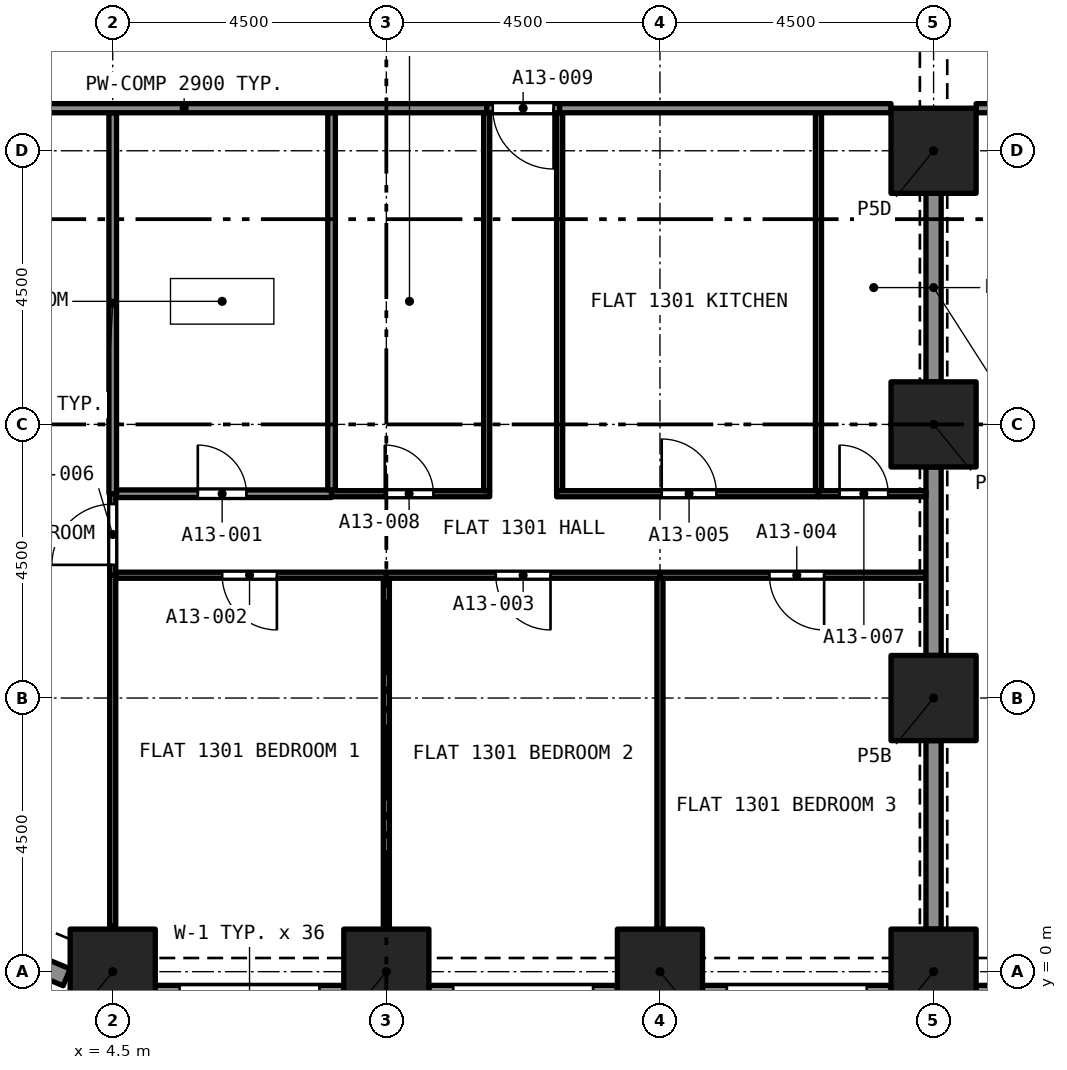
"""IFC4 building model, lengths in metres.
Left out: names, types, materials, properties, quantities, classifications, styles, units other than length and angle.
Written with IfcOpenShell. Run it as: python <this file> out.ifc"""

import sys

from ifc_helpers import new_model, si_unit, direction, frame, frame_2d, origin, origin_2d, place, context, subcontext, project, spatial, rectangle, extrude, element, fill, save


model = new_model("IFC4")
c1 = context("Model", 3, precision=1e-05, world=origin(), true_north=direction((0.0, 1.0)))
c2 = subcontext(c1, "Body", "Model", "MODEL_VIEW")
j1 = project(units=[si_unit("LENGTHUNIT", "METRE"), si_unit("PLANEANGLEUNIT", "RADIAN")], contexts=[c1])
p1 = place(None, origin())
s1 = spatial("IfcSite", under=j1, at=p1, CompositionType="ELEMENT")
p2 = place(p1, origin())
s2 = spatial("IfcBuilding", under=s1, at=p2, CompositionType="ELEMENT")
p3 = place(p2, frame((0.0, 0.0, 52.8)))
s3 = spatial("IfcBuildingStorey", under=s2, at=p3, CompositionType="ELEMENT", Elevation=52.8)
for number, where, z_axis, x_axis in (
    (1, (4.5, 0.0, 0.0), (0.0, 0.0, 1.0), (1.0, 0.0, 0.0)),
    (2, (9.0, 0.0, 0.0), (0.0, 0.0, 1.0), (1.0, 0.0, 0.0)),
    (3, (13.5, 0.0, 0.0), (0.0, 0.0, 1.0), (1.0, 0.0, 0.0)),
    (4, (18.0, 0.0, 0.0), (0.0, 0.0, 1.0), (1.0, 0.0, 0.0)),
    (5, (18.0, 4.5, 0.0), (0.0, 0.0, 1.0), (1.0, 0.0, 0.0)),
    (6, (18.0, 9.0, 0.0), (0.0, 0.0, 1.0), (1.0, 0.0, 0.0)),
    (7, (18.0, 13.5, 0.0), (0.0, 0.0, 1.0), (1.0, 0.0, 0.0)),
):
    element("IfcColumn", number, at=place(p3, frame(where, z_axis=z_axis, x_axis=x_axis)), inside=s3, PredefinedType="COLUMN", context=c2, shape_type="SweptSolid", body=[
        extrude(rectangle(XDim=1.4, YDim=1.4, at=origin_2d()), origin(), (0.0, 0.0, 1.0), 3.2),
    ])
p4 = place(p3, frame((3.743, -0.092, 0.0), z_axis=(0.0, 0.0, 1.0), x_axis=(-0.923857286003, 0.382737135771, 0.0)))
e8 = element("IfcWall", 8, at=p4, inside=s3, PredefinedType="SOLIDWALL", context=c2, shape_type="SweptSolid", body=[
    extrude(rectangle(XDim=1.865, YDim=0.3, at=frame_2d((0.933, 0.0))), origin(), (0.0, 0.0, 1.0), 3.2),
])
p5 = place(p4, frame((0.508, 0.0, 0.45)))
e9 = element("IfcOpeningElement", 9, at=p5, cuts=e8, PredefinedType="OPENING", context=c2, shape_type="SweptSolid", body=[
    extrude(rectangle(XDim=1.1, YDim=1.95, at=frame_2d((0.55, 0.975))), frame((0.0, 0.16, 0.0), z_axis=(0.0, -1.0, 0.0), x_axis=(1.0, 0.0, 0.0)), (0.0, 0.0, 1.0), 0.32),
])
p6 = place(p3, frame((8.3, -0.375, 0.0), z_axis=(0.0, 0.0, 1.0), x_axis=(-1.0, 0.0, 0.0)))
e10 = element("IfcWall", 10, at=p6, inside=s3, PredefinedType="SOLIDWALL", context=c2, shape_type="SweptSolid", body=[
    extrude(rectangle(XDim=3.1, YDim=0.3, at=frame_2d((1.55, 0.0))), origin(), (0.0, 0.0, 1.0), 3.2),
])
p7 = place(p6, frame((0.4, 0.0, 0.45)))
e11 = element("IfcOpeningElement", 11, at=p7, cuts=e10, PredefinedType="OPENING", context=c2, shape_type="SweptSolid", body=[
    extrude(rectangle(XDim=2.3, YDim=1.95, at=frame_2d((1.15, 0.975))), frame((0.0, 0.16, 0.0), z_axis=(0.0, -1.0, 0.0), x_axis=(1.0, 0.0, 0.0)), (0.0, 0.0, 1.0), 0.32),
])
p8 = place(p3, frame((12.8, -0.375, 0.0), z_axis=(0.0, 0.0, 1.0), x_axis=(-1.0, 0.0, 0.0)))
e12 = element("IfcWall", 12, at=p8, inside=s3, PredefinedType="SOLIDWALL", context=c2, shape_type="SweptSolid", body=[
    extrude(rectangle(XDim=3.1, YDim=0.3, at=frame_2d((1.55, 0.0))), origin(), (0.0, 0.0, 1.0), 3.2),
])
p9 = place(p8, frame((0.4, 0.0, 0.45)))
e13 = element("IfcOpeningElement", 13, at=p9, cuts=e12, PredefinedType="OPENING", context=c2, shape_type="SweptSolid", body=[
    extrude(rectangle(XDim=2.3, YDim=1.95, at=frame_2d((1.15, 0.975))), frame((0.0, 0.16, 0.0), z_axis=(0.0, -1.0, 0.0), x_axis=(1.0, 0.0, 0.0)), (0.0, 0.0, 1.0), 0.32),
])
p10 = place(p3, frame((17.3, -0.375, 0.0), z_axis=(0.0, 0.0, 1.0), x_axis=(-1.0, 0.0, 0.0)))
e14 = element("IfcWall", 14, at=p10, inside=s3, PredefinedType="SOLIDWALL", context=c2, shape_type="SweptSolid", body=[
    extrude(rectangle(XDim=3.1, YDim=0.3, at=frame_2d((1.55, 0.0))), origin(), (0.0, 0.0, 1.0), 3.2),
])
p11 = place(p10, frame((0.4, 0.0, 0.45)))
e15 = element("IfcOpeningElement", 15, at=p11, cuts=e14, PredefinedType="OPENING", context=c2, shape_type="SweptSolid", body=[
    extrude(rectangle(XDim=2.3, YDim=1.95, at=frame_2d((1.15, 0.975))), frame((0.0, 0.16, 0.0), z_axis=(0.0, -1.0, 0.0), x_axis=(1.0, 0.0, 0.0)), (0.0, 0.0, 1.0), 0.32),
])
p12 = place(p3, frame((21.8, -0.375, 0.0), z_axis=(0.0, 0.0, 1.0), x_axis=(-1.0, 0.0, 0.0)))
e16 = element("IfcWall", 16, at=p12, inside=s3, PredefinedType="SOLIDWALL", context=c2, shape_type="SweptSolid", body=[
    extrude(rectangle(XDim=3.1, YDim=0.3, at=frame_2d((1.55, 0.0))), origin(), (0.0, 0.0, 1.0), 3.2),
])
p13 = place(p12, frame((0.4, 0.0, 0.45)))
e17 = element("IfcOpeningElement", 17, at=p13, cuts=e16, PredefinedType="OPENING", context=c2, shape_type="SweptSolid", body=[
    extrude(rectangle(XDim=2.3, YDim=1.95, at=frame_2d((1.15, 0.975))), frame((0.0, 0.16, 0.0), z_axis=(0.0, -1.0, 0.0), x_axis=(1.0, 0.0, 0.0)), (0.0, 0.0, 1.0), 0.32),
])
p14 = place(p3, frame((4.562, 7.86, 0.0), z_axis=(0.0, 0.0, 1.0), x_axis=(1.0, 0.0, 0.0)))
e18 = element("IfcWall", 18, at=p14, inside=s3, PredefinedType="PARTITIONING", context=c2, shape_type="SweptSolid", body=[
    extrude(rectangle(XDim=3.536, YDim=0.125, at=frame_2d((1.768, 0.0))), origin(), (0.0, 0.0, 1.0), 2.9),
])
p15 = place(p14, frame((1.337, 0.0, 0.0)))
e19 = element("IfcOpeningElement", 19, at=p15, cuts=e18, PredefinedType="OPENING", context=c2, shape_type="SweptSolid", body=[
    extrude(rectangle(XDim=0.8, YDim=2.1, at=frame_2d((0.4, 1.05))), frame((0.0, 0.073, 0.0), z_axis=(0.0, -1.0, 0.0), x_axis=(1.0, 0.0, 0.0)), (0.0, 0.0, 1.0), 0.145),
])
p16 = place(p3, frame((4.5, 7.86, 0.0), z_axis=(0.0, 0.0, 1.0), x_axis=(0.0, 1.0, 0.0)))
e20 = element("IfcWall", 20, at=p16, inside=s3, PredefinedType="PARTITIONING", context=c2, shape_type="SweptSolid", body=[
    extrude(rectangle(XDim=6.265, YDim=0.125, at=frame_2d((3.132, 0.0))), origin(), (0.0, 0.0, 1.0), 2.9),
])
p17 = place(p3, frame((8.099, 7.923, 0.0), z_axis=(0.0, 0.0, 1.0), x_axis=(0.0, 1.0, 0.0)))
e21 = element("IfcWall", 21, at=p17, inside=s3, PredefinedType="PARTITIONING", context=c2, shape_type="SweptSolid", body=[
    extrude(rectangle(XDim=6.202, YDim=0.125, at=frame_2d((3.101, 0.0))), origin(), (0.0, 0.0, 1.0), 2.9),
])
p18 = place(p3, frame((9.0, 0.7, 0.0), z_axis=(0.0, 0.0, 1.0), x_axis=(0.0, 1.0, 0.0)))
e22 = element("IfcWall", 22, at=p18, inside=s3, PredefinedType="PARTITIONING", context=c2, shape_type="SweptSolid", body=[
    extrude(rectangle(XDim=5.77, YDim=0.1, at=frame_2d((2.885, 0.0))), origin(), (0.0, 0.0, 1.0), 2.9),
])
p19 = place(p3, frame((9.0, 6.52, 0.0), z_axis=(0.0, 0.0, 1.0), x_axis=(-1.0, 0.0, 0.0)))
e23 = element("IfcWall", 23, at=p19, inside=s3, PredefinedType="PARTITIONING", context=c2, shape_type="SweptSolid", body=[
    extrude(rectangle(XDim=4.45, YDim=0.1, at=frame_2d((2.225, 0.0))), origin(), (0.0, 0.0, 1.0), 2.9),
])
p20 = place(p19, frame((1.8, 0.0, 0.0)))
e24 = element("IfcOpeningElement", 24, at=p20, cuts=e23, PredefinedType="OPENING", context=c2, shape_type="SweptSolid", body=[
    extrude(rectangle(XDim=0.9, YDim=2.1, at=frame_2d((0.45, 1.05))), frame((0.0, 0.06, 0.0), z_axis=(0.0, -1.0, 0.0), x_axis=(1.0, 0.0, 0.0)), (0.0, 0.0, 1.0), 0.12),
])
p21 = place(p3, frame((4.5, 0.758, 0.0), z_axis=(0.0, 0.0, 1.0), x_axis=(0.0, 1.0, 0.0)))
e25 = element("IfcWall", 25, at=p21, inside=s3, PredefinedType="PARTITIONING", context=c2, shape_type="SweptSolid", body=[
    extrude(rectangle(XDim=5.762, YDim=0.1, at=frame_2d((2.881, 0.0))), origin(), (0.0, 0.0, 1.0), 2.9),
])
p22 = place(p3, frame((13.5, 0.7, 0.0), z_axis=(0.0, 0.0, 1.0), x_axis=(0.0, 1.0, 0.0)))
e26 = element("IfcWall", 26, at=p22, inside=s3, PredefinedType="PARTITIONING", context=c2, shape_type="SweptSolid", body=[
    extrude(rectangle(XDim=5.77, YDim=0.1, at=frame_2d((2.885, 0.0))), origin(), (0.0, 0.0, 1.0), 2.9),
])
p23 = place(p3, frame((13.5, 6.52, 0.0), z_axis=(0.0, 0.0, 1.0), x_axis=(-1.0, 0.0, 0.0)))
e27 = element("IfcWall", 27, at=p23, inside=s3, PredefinedType="PARTITIONING", context=c2, shape_type="SweptSolid", body=[
    extrude(rectangle(XDim=4.5, YDim=0.1, at=frame_2d((2.25, 0.0))), origin(), (0.0, 0.0, 1.0), 2.9),
])
p24 = place(p23, frame((1.8, 0.0, 0.0)))
e28 = element("IfcOpeningElement", 28, at=p24, cuts=e27, PredefinedType="OPENING", context=c2, shape_type="SweptSolid", body=[
    extrude(rectangle(XDim=0.9, YDim=2.1, at=frame_2d((0.45, 1.05))), frame((0.0, 0.06, 0.0), z_axis=(0.0, -1.0, 0.0), x_axis=(1.0, 0.0, 0.0)), (0.0, 0.0, 1.0), 0.12),
])
p25 = place(p3, frame((17.875, 6.52, 0.0), z_axis=(0.0, 0.0, 1.0), x_axis=(-1.0, 0.0, 0.0)))
e29 = element("IfcWall", 29, at=p25, inside=s3, PredefinedType="PARTITIONING", context=c2, shape_type="SweptSolid", body=[
    extrude(rectangle(XDim=4.375, YDim=0.1, at=frame_2d((2.188, 0.0))), origin(), (0.0, 0.0, 1.0), 2.9),
])
p26 = place(p25, frame((1.675, 0.0, 0.0)))
e30 = element("IfcOpeningElement", 30, at=p26, cuts=e29, PredefinedType="OPENING", context=c2, shape_type="SweptSolid", body=[
    extrude(rectangle(XDim=0.9, YDim=2.1, at=frame_2d((0.45, 1.05))), frame((0.0, 0.06, 0.0), z_axis=(0.0, -1.0, 0.0), x_axis=(1.0, 0.0, 0.0)), (0.0, 0.0, 1.0), 0.12),
])
for number, where, z_axis, x_axis in (
    (31, (18.0, 5.2, 0.0), (0.0, 0.0, 1.0), (0.0, 1.0, 0.0)),
    (32, (18.0, 0.7, 0.0), (0.0, 0.0, 1.0), (0.0, 1.0, 0.0)),
):
    element("IfcWall", number, at=place(p3, frame(where, z_axis=z_axis, x_axis=x_axis)), inside=s3, PredefinedType="PARTITIONING", context=c2, shape_type="SweptSolid", body=[
        extrude(rectangle(XDim=3.1, YDim=0.25, at=frame_2d((1.55, 0.0))), origin(), (0.0, 0.0, 1.0), 2.38),
    ])
p27 = place(p3, frame((11.85, 7.91, 0.0), z_axis=(0.0, 0.0, 1.0), x_axis=(0.0, 1.0, 0.0)))
e33 = element("IfcWall", 33, at=p27, inside=s3, PredefinedType="PARTITIONING", context=c2, shape_type="SweptSolid", body=[
    extrude(rectangle(XDim=6.215, YDim=0.1, at=frame_2d((3.107, 0.0))), origin(), (0.0, 0.0, 1.0), 2.9),
])
p28 = place(p3, frame((11.8, 7.86, 0.0), z_axis=(0.0, 0.0, 1.0), x_axis=(1.0, 0.0, 0.0)))
e34 = element("IfcWall", 34, at=p28, inside=s3, PredefinedType="PARTITIONING", context=c2, shape_type="SweptSolid", body=[
    extrude(rectangle(XDim=4.307, YDim=0.1, at=frame_2d((2.154, 0.0))), origin(), (0.0, 0.0, 1.0), 2.9),
])
p29 = place(p28, frame((1.729, 0.0, 0.0)))
e35 = element("IfcOpeningElement", 35, at=p29, cuts=e34, PredefinedType="OPENING", context=c2, shape_type="SweptSolid", body=[
    extrude(rectangle(XDim=0.9, YDim=2.1, at=frame_2d((0.45, 1.05))), frame((0.0, 0.06, 0.0), z_axis=(0.0, -1.0, 0.0), x_axis=(1.0, 0.0, 0.0)), (0.0, 0.0, 1.0), 0.12),
])
p30 = place(p3, frame((4.5, 6.52, 0.0), z_axis=(0.0, 0.0, 1.0), x_axis=(0.0, 1.0, 0.0)))
e36 = element("IfcWall", 36, at=p30, inside=s3, PredefinedType="PARTITIONING", context=c2, shape_type="SweptSolid", body=[
    extrude(rectangle(XDim=1.34, YDim=0.1, at=frame_2d((0.67, 0.0))), origin(), (0.0, 0.0, 1.0), 2.9),
])
p31 = place(p30, frame((0.17, 0.0, 0.0)))
e37 = element("IfcOpeningElement", 37, at=p31, cuts=e36, PredefinedType="OPENING", context=c2, shape_type="SweptSolid", body=[
    extrude(rectangle(XDim=1.0, YDim=2.1, at=frame_2d((0.5, 1.05))), frame((0.0, 0.06, 0.0), z_axis=(0.0, -1.0, 0.0), x_axis=(1.0, 0.0, 0.0)), (0.0, 0.0, 1.0), 0.12),
])
p32 = place(p3, frame((16.107, 7.86, 0.0), z_axis=(0.0, 0.0, 1.0), x_axis=(1.0, 0.0, 0.0)))
e38 = element("IfcWall", 38, at=p32, inside=s3, PredefinedType="PARTITIONING", context=c2, shape_type="SweptSolid", body=[
    extrude(rectangle(XDim=1.768, YDim=0.1, at=frame_2d((0.884, 0.0))), origin(), (0.0, 0.0, 1.0), 2.9),
])
p33 = place(p32, frame((0.346, 0.0, 0.0)))
e39 = element("IfcOpeningElement", 39, at=p33, cuts=e38, PredefinedType="OPENING", context=c2, shape_type="SweptSolid", body=[
    extrude(rectangle(XDim=0.8, YDim=2.1, at=frame_2d((0.4, 1.05))), frame((0.0, 0.06, 0.0), z_axis=(0.0, -1.0, 0.0), x_axis=(1.0, 0.0, 0.0)), (0.0, 0.0, 1.0), 0.12),
])
p34 = place(p3, frame((8.099, 7.86, 0.0), z_axis=(0.0, 0.0, 1.0), x_axis=(1.0, 0.0, 0.0)))
e40 = element("IfcWall", 40, at=p34, inside=s3, PredefinedType="PARTITIONING", context=c2, shape_type="SweptSolid", body=[
    extrude(rectangle(XDim=2.601, YDim=0.1, at=frame_2d((1.301, 0.0))), origin(), (0.0, 0.0, 1.0), 2.9),
])
p35 = place(p34, frame((0.876, 0.0, 0.0)))
e41 = element("IfcOpeningElement", 41, at=p35, cuts=e40, PredefinedType="OPENING", context=c2, shape_type="SweptSolid", body=[
    extrude(rectangle(XDim=0.8, YDim=2.1, at=frame_2d((0.4, 1.05))), frame((0.0, 0.06, 0.0), z_axis=(0.0, -1.0, 0.0), x_axis=(1.0, 0.0, 0.0)), (0.0, 0.0, 1.0), 0.12),
])
p36 = place(p3, frame((10.65, 7.91, 0.0), z_axis=(0.0, 0.0, 1.0), x_axis=(0.0, 1.0, 0.0)))
e42 = element("IfcWall", 42, at=p36, inside=s3, PredefinedType="PARTITIONING", context=c2, shape_type="SweptSolid", body=[
    extrude(rectangle(XDim=6.215, YDim=0.1, at=frame_2d((3.107, 0.0))), origin(), (0.0, 0.0, 1.0), 2.9),
])
p37 = place(p3, frame((11.85, 14.2, 0.0), z_axis=(0.0, 0.0, 1.0), x_axis=(-1.0, 0.0, 0.0)))
e43 = element("IfcWall", 43, at=p37, inside=s3, PredefinedType="PARTITIONING", context=c2, shape_type="SweptSolid", body=[
    extrude(rectangle(XDim=1.2, YDim=0.15, at=frame_2d((0.6, 0.0))), origin(), (0.0, 0.0, 1.0), 2.9),
])
p38 = place(p37, frame((0.1, 0.0, 0.0)))
e44 = element("IfcOpeningElement", 44, at=p38, cuts=e43, PredefinedType="OPENING", context=c2, shape_type="SweptSolid", body=[
    extrude(rectangle(XDim=1.0, YDim=2.1, at=frame_2d((0.5, 1.05))), frame((0.0, 0.085, 0.0), z_axis=(0.0, -1.0, 0.0), x_axis=(1.0, 0.0, 0.0)), (0.0, 0.0, 1.0), 0.17),
])
p39 = place(p3, frame((16.107, 7.91, 0.0), z_axis=(0.0, 0.0, 1.0), x_axis=(0.0, 1.0, 0.0)))
e45 = element("IfcWall", 45, at=p39, inside=s3, PredefinedType="PARTITIONING", context=c2, shape_type="SweptSolid", body=[
    extrude(rectangle(XDim=6.215, YDim=0.1, at=frame_2d((3.107, 0.0))), origin(), (0.0, 0.0, 1.0), 2.9),
])
p40 = place(p3, frame((11.85, 14.2, 0.0), z_axis=(0.0, 0.0, 1.0), x_axis=(1.0, 0.0, 0.0)))
e46 = element("IfcWall", 46, at=p40, inside=s3, PredefinedType="PARTITIONING", context=c2, shape_type="SweptSolid", body=[
    extrude(rectangle(XDim=5.45, YDim=0.15, at=frame_2d((2.725, 0.0))), origin(), (0.0, 0.0, 1.0), 2.9),
])
p41 = place(p3, frame((0.7, 14.2, 0.0), z_axis=(0.0, 0.0, 1.0), x_axis=(1.0, 0.0, 0.0)))
e47 = element("IfcWall", 47, at=p41, inside=s3, PredefinedType="PARTITIONING", context=c2, shape_type="SweptSolid", body=[
    extrude(rectangle(XDim=9.95, YDim=0.15, at=frame_2d((4.975, 0.0))), origin(), (0.0, 0.0, 1.0), 2.9),
])
p42 = place(p3, frame((18.0, 9.7, 0.0), z_axis=(0.0, 0.0, 1.0), x_axis=(0.0, 1.0, 0.0)))
e48 = element("IfcWall", 48, at=p42, inside=s3, PredefinedType="PARTITIONING", context=c2, shape_type="SweptSolid", body=[
    extrude(rectangle(XDim=3.1, YDim=0.25, at=frame_2d((1.55, 0.0))), origin(), (0.0, 0.0, 1.0), 2.38),
])
p43 = place(p3, frame((27.0, 14.2, 0.0), z_axis=(0.0, 0.0, 1.0), x_axis=(-1.0, 0.0, 0.0)))
e49 = element("IfcWall", 49, at=p43, inside=s3, PredefinedType="PARTITIONING", context=c2, shape_type="SweptSolid", body=[
    extrude(rectangle(XDim=8.3, YDim=0.15, at=frame_2d((4.15, 0.0))), origin(), (0.0, 0.0, 1.0), 2.75),
])
p44 = place(p43, frame((4.0, 0.0, 0.0)))
e50 = element("IfcOpeningElement", 50, at=p44, cuts=e49, PredefinedType="OPENING", context=c2, shape_type="SweptSolid", body=[
    extrude(rectangle(XDim=1.0, YDim=2.1, at=frame_2d((0.5, 1.05))), frame((0.0, 0.085, 0.0), z_axis=(0.0, -1.0, 0.0), x_axis=(1.0, 0.0, 0.0)), (0.0, 0.0, 1.0), 0.17),
])
p45 = place(p15, origin())
e51 = element("IfcDoor", 51, at=p45, inside=s3, OperationType="SINGLE_SWING_LEFT", PredefinedType="DOOR", context=c2, shape_type="SweptSolid", body=[
    extrude(rectangle(XDim=0.8, YDim=2.1, at=frame_2d((0.4, 1.05))), frame((0.0, 0.025, 0.0), z_axis=(0.0, -1.0, 0.0), x_axis=(1.0, 0.0, 0.0)), (0.0, 0.0, 1.0), 0.05),
])
fill(e19, e51)
p46 = place(p20, origin())
e52 = element("IfcDoor", 52, at=p46, inside=s3, OperationType="SINGLE_SWING_RIGHT", PredefinedType="DOOR", context=c2, shape_type="SweptSolid", body=[
    extrude(rectangle(XDim=0.9, YDim=2.1, at=frame_2d((0.45, 1.05))), frame((0.0, 0.025, 0.0), z_axis=(0.0, -1.0, 0.0), x_axis=(1.0, 0.0, 0.0)), (0.0, 0.0, 1.0), 0.05),
])
fill(e24, e52)
p47 = place(p24, origin())
e53 = element("IfcDoor", 53, at=p47, inside=s3, OperationType="SINGLE_SWING_LEFT", PredefinedType="DOOR", context=c2, shape_type="SweptSolid", body=[
    extrude(rectangle(XDim=0.9, YDim=2.1, at=frame_2d((0.45, 1.05))), frame((0.0, 0.025, 0.0), z_axis=(0.0, -1.0, 0.0), x_axis=(1.0, 0.0, 0.0)), (0.0, 0.0, 1.0), 0.05),
])
fill(e28, e53)
p48 = place(p26, origin())
e54 = element("IfcDoor", 54, at=p48, inside=s3, OperationType="SINGLE_SWING_LEFT", PredefinedType="DOOR", context=c2, shape_type="SweptSolid", body=[
    extrude(rectangle(XDim=0.9, YDim=2.1, at=frame_2d((0.45, 1.05))), frame((0.0, 0.025, 0.0), z_axis=(0.0, -1.0, 0.0), x_axis=(1.0, 0.0, 0.0)), (0.0, 0.0, 1.0), 0.05),
])
fill(e30, e54)
p49 = place(p29, origin())
e55 = element("IfcDoor", 55, at=p49, inside=s3, OperationType="SINGLE_SWING_RIGHT", PredefinedType="DOOR", context=c2, shape_type="SweptSolid", body=[
    extrude(rectangle(XDim=0.9, YDim=2.1, at=frame_2d((0.45, 1.05))), frame((0.0, 0.025, 0.0), z_axis=(0.0, -1.0, 0.0), x_axis=(1.0, 0.0, 0.0)), (0.0, 0.0, 1.0), 0.05),
])
fill(e35, e55)
p50 = place(p31, origin())
e56 = element("IfcDoor", 56, at=p50, inside=s3, OperationType="SINGLE_SWING_RIGHT", PredefinedType="DOOR", context=c2, shape_type="SweptSolid", body=[
    extrude(rectangle(XDim=1.0, YDim=2.1, at=frame_2d((0.5, 1.05))), frame((0.0, 0.025, 0.0), z_axis=(0.0, -1.0, 0.0), x_axis=(1.0, 0.0, 0.0)), (0.0, 0.0, 1.0), 0.05),
])
fill(e37, e56)
p51 = place(p33, origin())
e57 = element("IfcDoor", 57, at=p51, inside=s3, OperationType="SINGLE_SWING_LEFT", PredefinedType="DOOR", context=c2, shape_type="SweptSolid", body=[
    extrude(rectangle(XDim=0.8, YDim=2.1, at=frame_2d((0.4, 1.05))), frame((0.0, 0.025, 0.0), z_axis=(0.0, -1.0, 0.0), x_axis=(1.0, 0.0, 0.0)), (0.0, 0.0, 1.0), 0.05),
])
fill(e39, e57)
p52 = place(p35, origin())
e58 = element("IfcDoor", 58, at=p52, inside=s3, OperationType="SINGLE_SWING_LEFT", PredefinedType="DOOR", context=c2, shape_type="SweptSolid", body=[
    extrude(rectangle(XDim=0.8, YDim=2.1, at=frame_2d((0.4, 1.05))), frame((0.0, 0.025, 0.0), z_axis=(0.0, -1.0, 0.0), x_axis=(1.0, 0.0, 0.0)), (0.0, 0.0, 1.0), 0.05),
])
fill(e41, e58)
p53 = place(p38, origin())
e59 = element("IfcDoor", 59, at=p53, inside=s3, OperationType="SINGLE_SWING_RIGHT", PredefinedType="DOOR", context=c2, shape_type="SweptSolid", body=[
    extrude(rectangle(XDim=1.0, YDim=2.1, at=frame_2d((0.5, 1.05))), frame((0.0, 0.025, 0.0), z_axis=(0.0, -1.0, 0.0), x_axis=(1.0, 0.0, 0.0)), (0.0, 0.0, 1.0), 0.05),
])
fill(e44, e59)
save(model, sys.argv[1])
